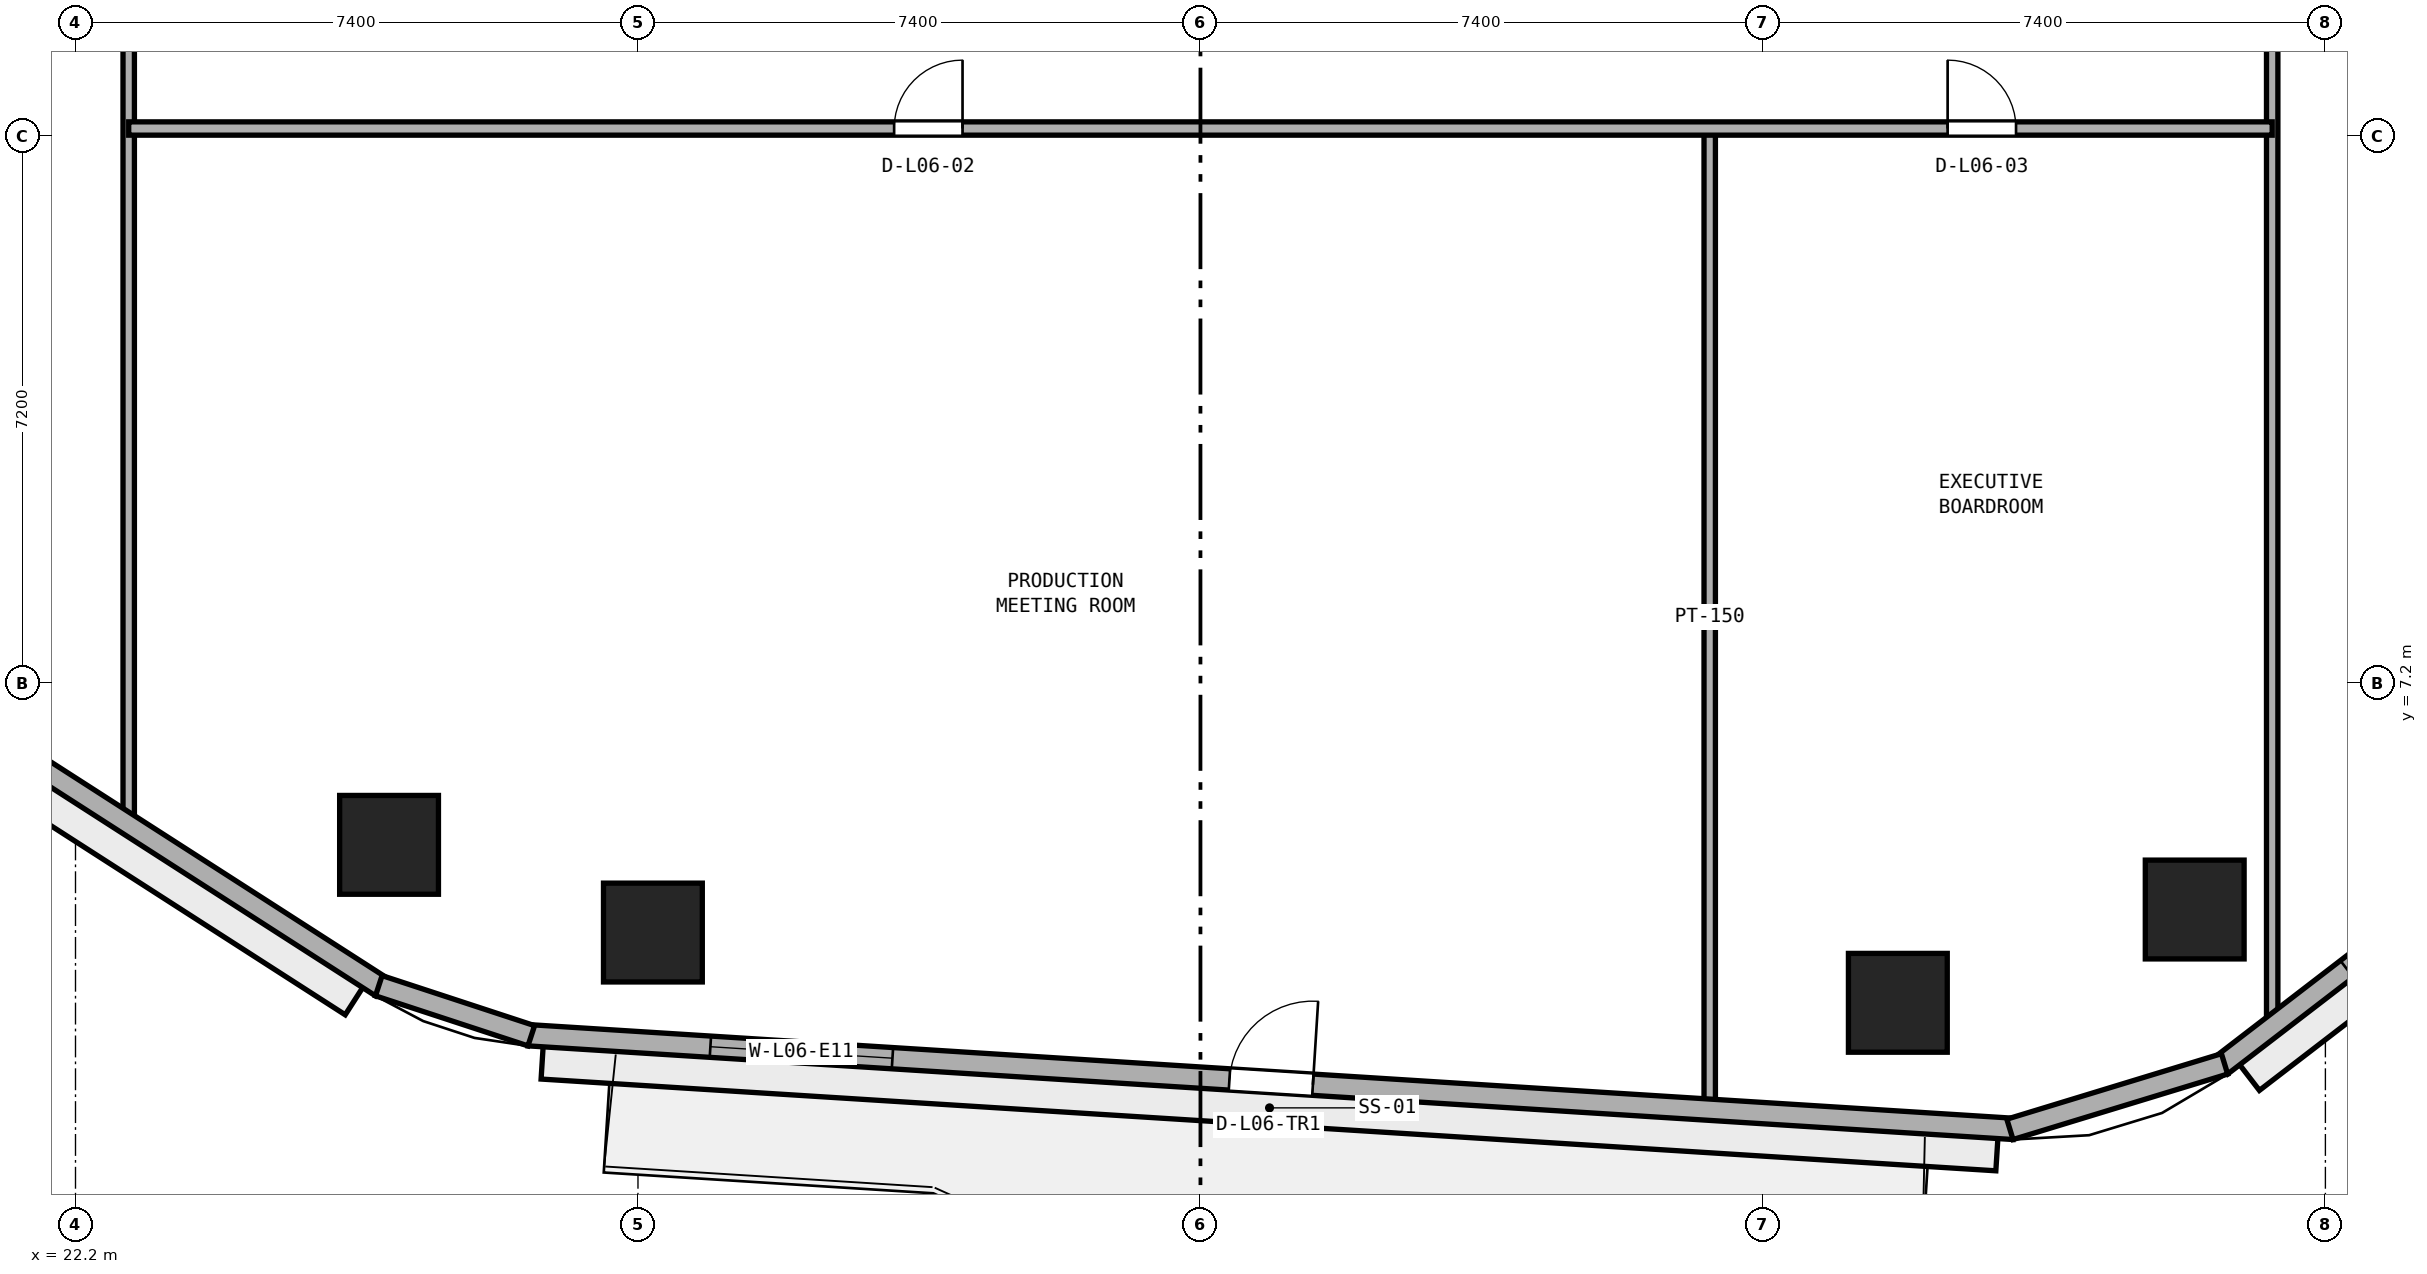
"""IFC4 building model, lengths in metres.
Left out: names, types, materials, properties, quantities, classifications, styles, units other than length and angle.
Written with IfcOpenShell. Run it as: python <this file> out.ifc"""

import sys

from ifc_helpers import new_model, si_unit, direction, frame, frame_2d, origin, origin_2d, place, context, subcontext, project, spatial, rectangle, extrude, element, fill, save


model = new_model("IFC4")
c1 = context("Model", 3, precision=1e-05, world=origin(), true_north=direction((0.0, 1.0)))
c2 = subcontext(c1, "Body", "Model", "MODEL_VIEW")
j1 = project(units=[si_unit("LENGTHUNIT", "METRE"), si_unit("PLANEANGLEUNIT", "RADIAN")], contexts=[c1])
p1 = place(None, origin())
s1 = spatial("IfcSite", under=j1, at=p1, CompositionType="ELEMENT")
p2 = place(p1, origin())
s2 = spatial("IfcBuilding", under=s1, at=p2, CompositionType="ELEMENT")
p3 = place(p2, frame((0.0, 0.0, 28.8)))
s3 = spatial("IfcBuildingStorey", under=s2, at=p3, CompositionType="ELEMENT", Elevation=28.8)
for number, where, z_axis, x_axis in (
    (1, (29.796, 3.922, 0.0), (0.0, 0.0, 1.0), (1.0, 0.0, 0.0)),
    (2, (46.175, 2.998, 0.0), (0.0, 0.0, 1.0), (1.0, 0.0, 0.0)),
    (3, (50.081, 4.225, 0.0), (0.0, 0.0, 1.0), (1.0, 0.0, 0.0)),
    (4, (26.325, 5.076, 0.0), (0.0, 0.0, 1.0), (1.0, 0.0, 0.0)),
):
    element("IfcColumn", number, at=place(p3, frame(where, z_axis=z_axis, x_axis=x_axis)), inside=s3, PredefinedType="COLUMN", context=c2, shape_type="SweptSolid", body=[
        extrude(rectangle(XDim=1.3, YDim=1.3, at=origin_2d()), origin(), (0.0, 0.0, 1.0), 3.8),
    ])
p4 = place(p3, frame((51.1, 2.651, 0.0), z_axis=(0.0, 0.0, 1.0), x_axis=(0.0, 1.0, 0.0)))
e5 = element("IfcWall", 5, at=p4, inside=s3, PredefinedType="PARTITIONING", context=c2, shape_type="SweptSolid", body=[
    extrude(rectangle(XDim=45.255, YDim=0.15, at=frame_2d((22.627, 0.0))), origin(), (0.0, 0.0, 1.0), 3.525),
])
p5 = place(p4, frame((15.699, 0.0, 0.0)))
e6 = element("IfcOpeningElement", 6, at=p5, cuts=e5, PredefinedType="OPENING", context=c2, shape_type="SweptSolid", body=[
    extrude(rectangle(XDim=0.9, YDim=2.1, at=frame_2d((0.45, 1.05))), frame((0.0, 0.085, 0.0), z_axis=(0.0, -1.0, 0.0), x_axis=(1.0, 0.0, 0.0)), (0.0, 0.0, 1.0), 0.17),
])
p6 = place(p4, frame((26.349, 0.0, 0.0)))
e7 = element("IfcOpeningElement", 7, at=p6, cuts=e5, PredefinedType="OPENING", context=c2, shape_type="SweptSolid", body=[
    extrude(rectangle(XDim=1.0, YDim=2.12, at=frame_2d((0.5, 1.06))), frame((0.0, 0.085, 0.0), z_axis=(0.0, -1.0, 0.0), x_axis=(1.0, 0.0, 0.0)), (0.0, 0.0, 1.0), 0.17),
])
p7 = place(p3, frame((43.7, 1.656, 0.0), z_axis=(0.0, 0.0, 1.0), x_axis=(0.0, 1.0, 0.0)))
e8 = element("IfcWall", 8, at=p7, inside=s3, PredefinedType="PARTITIONING", context=c2, shape_type="SweptSolid", body=[
    extrude(rectangle(XDim=12.844, YDim=0.15, at=frame_2d((6.422, 0.0))), origin(), (0.0, 0.0, 1.0), 3.525),
])
p8 = place(p3, frame((22.9, 5.316, 0.0), z_axis=(0.0, 0.0, 1.0), x_axis=(0.0, 1.0, 0.0)))
e9 = element("IfcWall", 9, at=p8, inside=s3, PredefinedType="PARTITIONING", context=c2, shape_type="SweptSolid", body=[
    extrude(rectangle(XDim=39.555, YDim=0.15, at=frame_2d((19.777, 0.0))), origin(), (0.0, 0.0, 1.0), 3.525),
])
p9 = place(p8, frame((12.135, 0.0, 0.0)))
e10 = element("IfcOpeningElement", 10, at=p9, cuts=e9, PredefinedType="OPENING", context=c2, shape_type="SweptSolid", body=[
    extrude(rectangle(XDim=0.9, YDim=2.1, at=frame_2d((0.45, 1.05))), frame((0.0, 0.085, 0.0), z_axis=(0.0, -1.0, 0.0), x_axis=(1.0, 0.0, 0.0)), (0.0, 0.0, 1.0), 0.17),
])
p10 = place(p8, frame((22.834, 0.0, 0.0)))
e11 = element("IfcOpeningElement", 11, at=p10, cuts=e9, PredefinedType="OPENING", context=c2, shape_type="SweptSolid", body=[
    extrude(rectangle(XDim=0.9, YDim=2.1, at=frame_2d((0.45, 1.05))), frame((0.0, 0.085, 0.0), z_axis=(0.0, -1.0, 0.0), x_axis=(1.0, 0.0, 0.0)), (0.0, 0.0, 1.0), 0.17),
])
p11 = place(p3, frame((22.9, 14.5, 0.0), z_axis=(0.0, 0.0, 1.0), x_axis=(1.0, 0.0, 0.0)))
e12 = element("IfcWall", 12, at=p11, inside=s3, PredefinedType="PARTITIONING", context=c2, shape_type="SweptSolid", body=[
    extrude(rectangle(XDim=28.2, YDim=0.175, at=frame_2d((14.1, 0.0))), origin(), (0.0, 0.0, 1.0), 3.525),
])
p12 = place(p11, frame((10.07, 0.0, 0.0)))
e13 = element("IfcOpeningElement", 13, at=p12, cuts=e12, PredefinedType="OPENING", context=c2, shape_type="SweptSolid", body=[
    extrude(rectangle(XDim=0.9, YDim=2.1, at=frame_2d((0.45, 1.05))), frame((0.0, 0.097, 0.0), z_axis=(0.0, -1.0, 0.0), x_axis=(1.0, 0.0, 0.0)), (0.0, 0.0, 1.0), 0.195),
])
p13 = place(p11, frame((23.93, 0.0, 0.0)))
e14 = element("IfcOpeningElement", 14, at=p13, cuts=e12, PredefinedType="OPENING", context=c2, shape_type="SweptSolid", body=[
    extrude(rectangle(XDim=0.9, YDim=2.1, at=frame_2d((0.45, 1.05))), frame((0.0, 0.097, 0.0), z_axis=(0.0, -1.0, 0.0), x_axis=(1.0, 0.0, 0.0)), (0.0, 0.0, 1.0), 0.195),
])
p14 = place(p3, frame((28.161, 2.571, 0.0), z_axis=(0.0, 0.0, 1.0), x_axis=(0.998017288298, -0.06294038654, 0.0)))
e15 = element("IfcWall", 15, at=p14, inside=s3, PredefinedType="STANDARD", context=c2, shape_type="SweptSolid", body=[
    extrude(rectangle(XDim=19.577, YDim=0.28, at=frame_2d((9.789, 0.0))), origin(), (0.0, 0.0, 1.0), 3.525),
])
p15 = place(p14, frame((9.239, 0.0, 0.0)))
e16 = element("IfcOpeningElement", 16, at=p15, cuts=e15, PredefinedType="OPENING", context=c2, shape_type="SweptSolid", body=[
    extrude(rectangle(XDim=1.1, YDim=2.2, at=frame_2d((0.55, 1.1))), frame((0.0, 0.15, 0.0), z_axis=(0.0, -1.0, 0.0), x_axis=(1.0, 0.0, 0.0)), (0.0, 0.0, 1.0), 0.3),
])
p16 = place(p14, frame((2.396, 0.0, 0.9)))
e17 = element("IfcOpeningElement", 17, at=p16, cuts=e15, PredefinedType="OPENING", context=c2, shape_type="SweptSolid", body=[
    extrude(rectangle(XDim=2.4, YDim=1.75, at=frame_2d((1.2, 0.875))), frame((0.0, 0.15, 0.0), z_axis=(0.0, -1.0, 0.0), x_axis=(1.0, 0.0, 0.0)), (0.0, 0.0, 1.0), 0.3),
])
p17 = place(p3, frame((50.429, 2.172, 0.0), z_axis=(0.0, 0.0, 1.0), x_axis=(0.792937466367, 0.609303023488, 0.0)))
e18 = element("IfcWall", 18, at=p17, inside=s3, PredefinedType="STANDARD", context=c2, shape_type="SweptSolid", body=[
    extrude(rectangle(XDim=17.713, YDim=0.28, at=frame_2d((8.856, 0.0))), origin(), (0.0, 0.0, 1.0), 3.525),
])
p18 = place(p17, frame((2.085, 0.0, 0.9)))
e19 = element("IfcOpeningElement", 19, at=p18, cuts=e18, PredefinedType="OPENING", context=c2, shape_type="SweptSolid", body=[
    extrude(rectangle(XDim=2.4, YDim=1.75, at=frame_2d((1.2, 0.875))), frame((0.0, 0.15, 0.0), z_axis=(0.0, -1.0, 0.0), x_axis=(1.0, 0.0, 0.0)), (0.0, 0.0, 1.0), 0.3),
])
p19 = place(p17, frame((7.656, 0.0, 0.9)))
e20 = element("IfcOpeningElement", 20, at=p19, cuts=e18, PredefinedType="OPENING", context=c2, shape_type="SweptSolid", body=[
    extrude(rectangle(XDim=2.4, YDim=1.75, at=frame_2d((1.2, 0.875))), frame((0.0, 0.15, 0.0), z_axis=(0.0, -1.0, 0.0), x_axis=(1.0, 0.0, 0.0)), (0.0, 0.0, 1.0), 0.3),
])
p20 = place(p17, frame((13.227, 0.0, 0.9)))
e21 = element("IfcOpeningElement", 21, at=p20, cuts=e18, PredefinedType="OPENING", context=c2, shape_type="SweptSolid", body=[
    extrude(rectangle(XDim=2.4, YDim=1.75, at=frame_2d((1.2, 0.875))), frame((0.0, 0.15, 0.0), z_axis=(0.0, -1.0, 0.0), x_axis=(1.0, 0.0, 0.0)), (0.0, 0.0, 1.0), 0.3),
])
p21 = place(p3, frame((11.405, 12.728, 0.0), z_axis=(0.0, 0.0, 1.0), x_axis=(0.841304564637, -0.540561402175, 0.0)))
e22 = element("IfcWall", 22, at=p21, inside=s3, PredefinedType="STANDARD", context=c2, shape_type="SweptSolid", body=[
    extrude(rectangle(XDim=17.612, YDim=0.28, at=frame_2d((8.806, 0.0))), origin(), (0.0, 0.0, 1.0), 3.525),
])
p22 = place(p21, frame((2.069, 0.0, 0.9)))
e23 = element("IfcOpeningElement", 23, at=p22, cuts=e22, PredefinedType="OPENING", context=c2, shape_type="SweptSolid", body=[
    extrude(rectangle(XDim=2.4, YDim=1.75, at=frame_2d((1.2, 0.875))), frame((0.0, 0.15, 0.0), z_axis=(0.0, -1.0, 0.0), x_axis=(1.0, 0.0, 0.0)), (0.0, 0.0, 1.0), 0.3),
])
p23 = place(p21, frame((7.606, 0.0, 0.9)))
e24 = element("IfcOpeningElement", 24, at=p23, cuts=e22, PredefinedType="OPENING", context=c2, shape_type="SweptSolid", body=[
    extrude(rectangle(XDim=2.4, YDim=1.75, at=frame_2d((1.2, 0.875))), frame((0.0, 0.15, 0.0), z_axis=(0.0, -1.0, 0.0), x_axis=(1.0, 0.0, 0.0)), (0.0, 0.0, 1.0), 0.3),
])
p24 = place(p3, frame((47.65, 1.333, 0.0), z_axis=(0.0, 0.0, 1.0), x_axis=(0.956461287977, 0.291859220516, 0.0)))
e25 = element("IfcWall", 25, at=p24, inside=s3, PredefinedType="STANDARD", context=c2, shape_type="SweptSolid", body=[
    extrude(rectangle(XDim=2.952, YDim=0.28, at=frame_2d((1.476, 0.0))), origin(), (0.0, 0.0, 1.0), 3.525),
])
p25 = place(p3, frame((26.19, 3.223, 0.0), z_axis=(0.0, 0.0, 1.0), x_axis=(0.95016442175, -0.311749212734, 0.0)))
e26 = element("IfcWall", 26, at=p25, inside=s3, PredefinedType="STANDARD", context=c2, shape_type="SweptSolid", body=[
    extrude(rectangle(XDim=2.111, YDim=0.28, at=frame_2d((1.056, 0.0))), origin(), (0.0, 0.0, 1.0), 3.525),
])
p26 = place(p12, origin())
e27 = element("IfcDoor", 27, at=p26, inside=s3, OperationType="SINGLE_SWING_RIGHT", PredefinedType="DOOR", context=c2, shape_type="SweptSolid", body=[
    extrude(rectangle(XDim=0.9, YDim=2.1, at=frame_2d((0.45, 1.05))), frame((0.0, 0.025, 0.0), z_axis=(0.0, -1.0, 0.0), x_axis=(1.0, 0.0, 0.0)), (0.0, 0.0, 1.0), 0.05),
])
fill(e13, e27)
p27 = place(p13, origin())
e28 = element("IfcDoor", 28, at=p27, inside=s3, OperationType="SINGLE_SWING_LEFT", PredefinedType="DOOR", context=c2, shape_type="SweptSolid", body=[
    extrude(rectangle(XDim=0.9, YDim=2.1, at=frame_2d((0.45, 1.05))), frame((0.0, 0.025, 0.0), z_axis=(0.0, -1.0, 0.0), x_axis=(1.0, 0.0, 0.0)), (0.0, 0.0, 1.0), 0.05),
])
fill(e14, e28)
p28 = place(p15, origin())
e29 = element("IfcDoor", 29, at=p28, inside=s3, OperationType="SINGLE_SWING_RIGHT", PredefinedType="DOOR", context=c2, shape_type="SweptSolid", body=[
    extrude(rectangle(XDim=1.1, YDim=2.2, at=frame_2d((0.55, 1.1))), frame((0.0, 0.025, 0.0), z_axis=(0.0, -1.0, 0.0), x_axis=(1.0, 0.0, 0.0)), (0.0, 0.0, 1.0), 0.05),
])
fill(e16, e29)
p29 = place(p16, origin())
e30 = element("IfcWindow", 30, at=p29, inside=s3, PartitioningType="SINGLE_PANEL", PredefinedType="WINDOW", context=c2, shape_type="SweptSolid", body=[
    extrude(rectangle(XDim=2.4, YDim=1.75, at=frame_2d((1.2, 0.875))), frame((0.0, 0.03, 0.0), z_axis=(0.0, -1.0, 0.0), x_axis=(1.0, 0.0, 0.0)), (0.0, 0.0, 1.0), 0.06),
])
fill(e17, e30)
p30 = place(p18, origin())
e31 = element("IfcWindow", 31, at=p30, inside=s3, PartitioningType="SINGLE_PANEL", PredefinedType="WINDOW", context=c2, shape_type="SweptSolid", body=[
    extrude(rectangle(XDim=2.4, YDim=1.75, at=frame_2d((1.2, 0.875))), frame((0.0, 0.03, 0.0), z_axis=(0.0, -1.0, 0.0), x_axis=(1.0, 0.0, 0.0)), (0.0, 0.0, 1.0), 0.06),
])
fill(e19, e31)
save(model, sys.argv[1])
